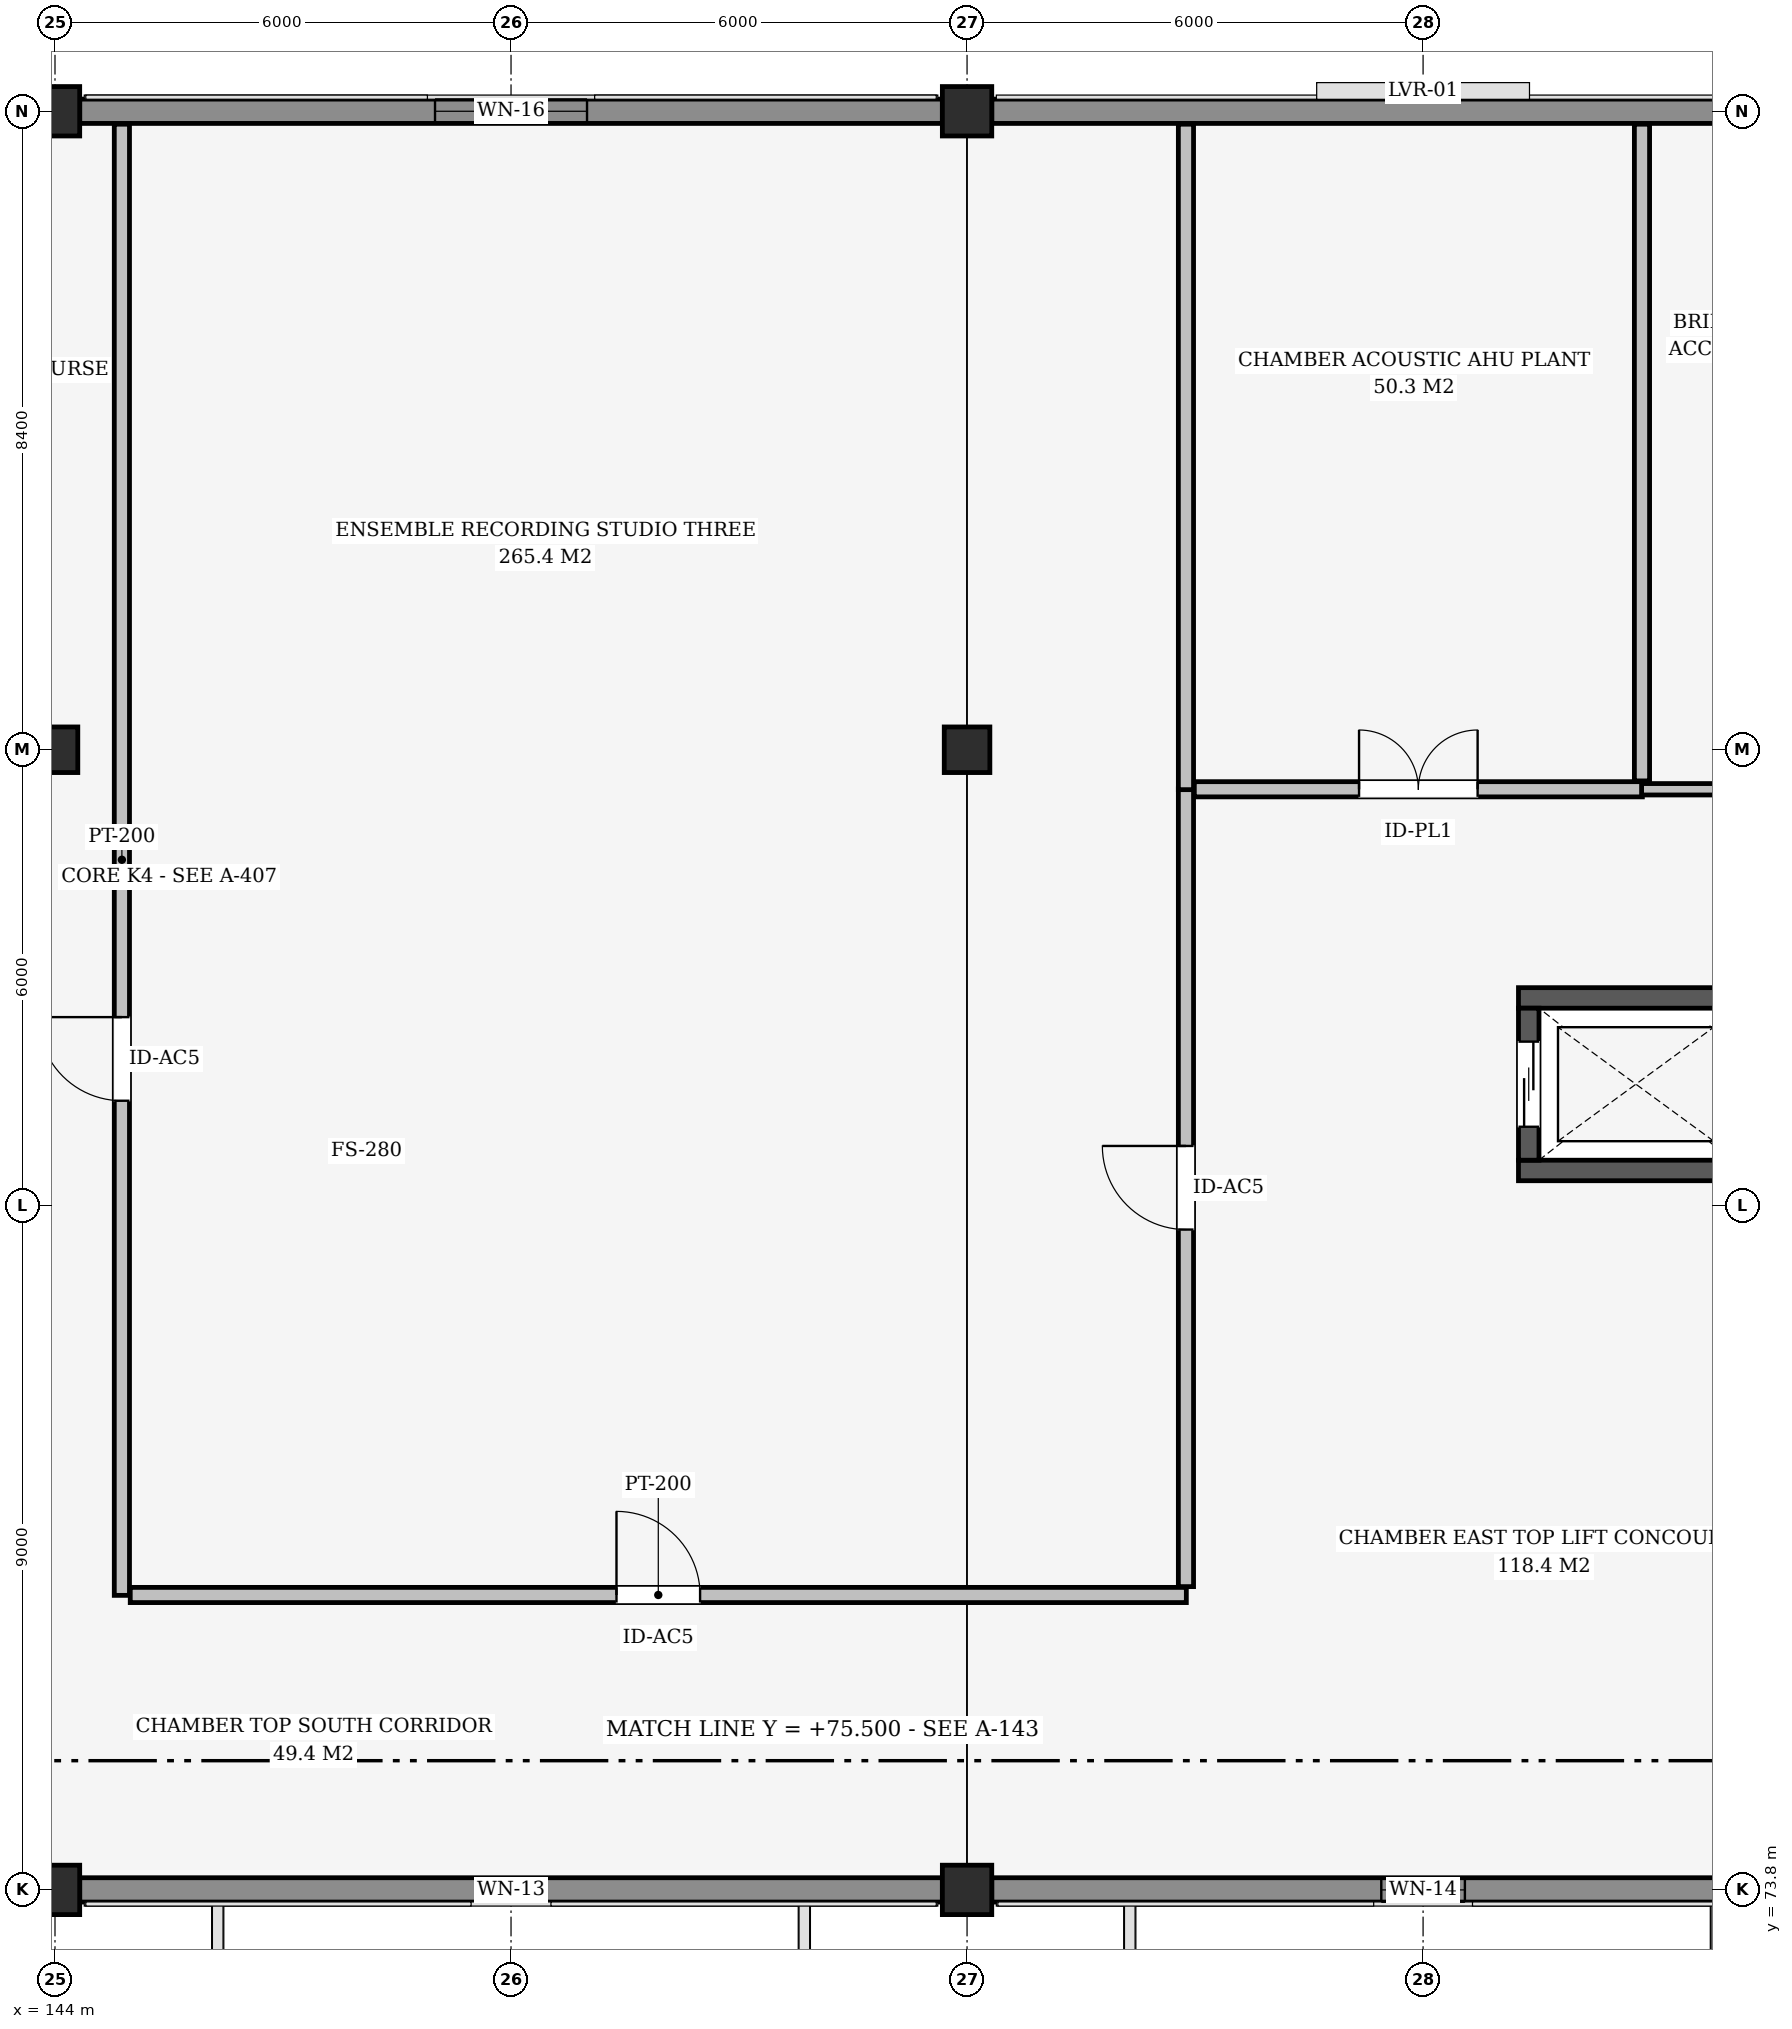
"""IFC4 building model, lengths in metres.
Left out: names, types, materials, properties, quantities, classifications, styles, units other than length and angle.
Written with IfcOpenShell. Run it as: python <this file> out.ifc"""

import sys

from ifc_helpers import new_model, si_unit, direction, frame, frame_2d, origin, origin_2d, place, context, subcontext, project, spatial, rectangle, extrude, element, fill, save


model = new_model("IFC4")
c1 = context("Model", 3, precision=1e-05, world=origin(), true_north=direction((0.0, 1.0)))
c2 = subcontext(c1, "Body", "Model", "MODEL_VIEW")
j1 = project(units=[si_unit("LENGTHUNIT", "METRE"), si_unit("PLANEANGLEUNIT", "RADIAN")], contexts=[c1])
p1 = place(None, origin())
s1 = spatial("IfcSite", under=j1, at=p1, CompositionType="ELEMENT")
p2 = place(p1, origin())
s2 = spatial("IfcBuilding", under=s1, at=p2, CompositionType="ELEMENT")
p3 = place(p2, frame((0.0, 0.0, 13.8)))
s3 = spatial("IfcBuildingStorey", under=s2, at=p3, CompositionType="ELEMENT", Elevation=13.8)
p4 = place(p3, frame((144.0, 73.8, 0.0), z_axis=(0.0, 0.0, 1.0), x_axis=(1.0, 0.0, 0.0)))
e1 = element("IfcColumn", 1, at=p4, inside=s3, PredefinedType="COLUMN", context=c2, shape_type="SweptSolid", body=[
    extrude(rectangle(XDim=0.65, YDim=0.65, at=origin_2d()), origin(), (0.0, 0.0, 1.0), 4.5),
])
p5 = place(p3, frame((144.0, 88.8, 0.0), z_axis=(0.0, 0.0, 1.0), x_axis=(1.0, 0.0, 0.0)))
e2 = element("IfcColumn", 2, at=p5, inside=s3, PredefinedType="COLUMN", context=c2, shape_type="SweptSolid", body=[
    extrude(rectangle(XDim=0.6, YDim=0.6, at=origin_2d()), origin(), (0.0, 0.0, 1.0), 4.5),
])
for number, where, z_axis, x_axis in (
    (3, (144.0, 97.2, 0.0), (0.0, 0.0, 1.0), (1.0, 0.0, 0.0)),
    (4, (156.0, 73.8, 0.0), (0.0, 0.0, 1.0), (1.0, 0.0, 0.0)),
):
    element("IfcColumn", number, at=place(p3, frame(where, z_axis=z_axis, x_axis=x_axis)), inside=s3, PredefinedType="COLUMN", context=c2, shape_type="SweptSolid", body=[
        extrude(rectangle(XDim=0.65, YDim=0.65, at=origin_2d()), origin(), (0.0, 0.0, 1.0), 4.5),
    ])
p6 = place(p3, frame((156.0, 88.8, 0.0), z_axis=(0.0, 0.0, 1.0), x_axis=(1.0, 0.0, 0.0)))
e5 = element("IfcColumn", 5, at=p6, inside=s3, PredefinedType="COLUMN", context=c2, shape_type="SweptSolid", body=[
    extrude(rectangle(XDim=0.6, YDim=0.6, at=origin_2d()), origin(), (0.0, 0.0, 1.0), 4.5),
])
p7 = place(p3, frame((156.0, 97.2, 0.0), z_axis=(0.0, 0.0, 1.0), x_axis=(1.0, 0.0, 0.0)))
e6 = element("IfcColumn", 6, at=p7, inside=s3, PredefinedType="COLUMN", context=c2, shape_type="SweptSolid", body=[
    extrude(rectangle(XDim=0.65, YDim=0.65, at=origin_2d()), origin(), (0.0, 0.0, 1.0), 4.5),
])
p8 = place(p3, frame((155.675, 73.8, 0.0), z_axis=(0.0, 0.0, 1.0), x_axis=(-1.0, 0.0, 0.0)))
e7 = element("IfcWall", 7, at=p8, inside=s3, PredefinedType="SOLIDWALL", context=c2, shape_type="SweptSolid", body=[
    extrude(rectangle(XDim=11.35, YDim=0.32, at=frame_2d((5.675, 0.0))), origin(), (0.0, 0.0, 1.0), 3.944),
])
p9 = place(p8, frame((5.25, 0.0, 0.6)))
e8 = element("IfcOpeningElement", 8, at=p9, cuts=e7, PredefinedType="OPENING", context=c2, shape_type="SweptSolid", body=[
    extrude(rectangle(XDim=0.85, YDim=2.35, at=frame_2d((0.425, 1.175))), frame((0.0, 0.17, 0.0), z_axis=(0.0, -1.0, 0.0), x_axis=(1.0, 0.0, 0.0)), (0.0, 0.0, 1.0), 0.34),
])
p10 = place(p3, frame((167.675, 73.8, 0.0), z_axis=(0.0, 0.0, 1.0), x_axis=(-1.0, 0.0, 0.0)))
e9 = element("IfcWall", 9, at=p10, inside=s3, PredefinedType="SOLIDWALL", context=c2, shape_type="SweptSolid", body=[
    extrude(rectangle(XDim=11.35, YDim=0.32, at=frame_2d((5.675, 0.0))), origin(), (0.0, 0.0, 1.0), 3.944),
])
p11 = place(p10, frame((5.125, 0.0, 0.6)))
e10 = element("IfcOpeningElement", 10, at=p11, cuts=e9, PredefinedType="OPENING", context=c2, shape_type="SweptSolid", body=[
    extrude(rectangle(XDim=1.1, YDim=2.4, at=frame_2d((0.55, 1.2))), frame((0.0, 0.17, 0.0), z_axis=(0.0, -1.0, 0.0), x_axis=(1.0, 0.0, 0.0)), (0.0, 0.0, 1.0), 0.34),
])
p12 = place(p3, frame((144.325, 97.2, 0.0), z_axis=(0.0, 0.0, 1.0), x_axis=(1.0, 0.0, 0.0)))
e11 = element("IfcWall", 11, at=p12, inside=s3, PredefinedType="SOLIDWALL", context=c2, shape_type="SweptSolid", body=[
    extrude(rectangle(XDim=11.35, YDim=0.32, at=frame_2d((5.675, 0.0))), origin(), (0.0, 0.0, 1.0), 3.944),
])
p13 = place(p12, frame((4.675, 0.0, 0.85)))
e12 = element("IfcOpeningElement", 12, at=p13, cuts=e11, PredefinedType="OPENING", context=c2, shape_type="SweptSolid", body=[
    extrude(rectangle(XDim=2.0, YDim=1.85, at=frame_2d((1.0, 0.925))), frame((0.0, 0.17, 0.0), z_axis=(0.0, -1.0, 0.0), x_axis=(1.0, 0.0, 0.0)), (0.0, 0.0, 1.0), 0.34),
])
p14 = place(p3, frame((156.325, 97.2, 0.0), z_axis=(0.0, 0.0, 1.0), x_axis=(1.0, 0.0, 0.0)))
e13 = element("IfcWall", 13, at=p14, inside=s3, PredefinedType="SOLIDWALL", context=c2, shape_type="SweptSolid", body=[
    extrude(rectangle(XDim=11.35, YDim=0.32, at=frame_2d((5.675, 0.0))), origin(), (0.0, 0.0, 1.0), 3.944),
])
for number, where, z_axis, x_axis in (
    (14, (163.255, 83.265, 0.0), (0.0, 0.0, 1.0), (1.0, 0.0, 0.0)),
    (15, (163.255, 85.535, 0.0), (0.0, 0.0, 1.0), (1.0, 0.0, 0.0)),
):
    element("IfcWall", number, at=place(p3, frame(where, z_axis=z_axis, x_axis=x_axis)), inside=s3, PredefinedType="SHEAR", context=c2, shape_type="SweptSolid", body=[
        extrude(rectangle(XDim=3.09, YDim=0.27, at=frame_2d((1.545, 0.0))), origin(), (0.0, 0.0, 1.0), 4.5),
    ])
p15 = place(p3, frame((163.39, 83.4, 0.0), z_axis=(0.0, 0.0, 1.0), x_axis=(0.0, 1.0, 0.0)))
e16 = element("IfcWall", 16, at=p15, inside=s3, PredefinedType="SHEAR", context=c2, shape_type="SweptSolid", body=[
    extrude(rectangle(XDim=2.0, YDim=0.27, at=frame_2d((1.0, 0.0))), origin(), (0.0, 0.0, 1.0), 4.5),
])
p16 = place(p15, frame((0.44, 0.0, 0.0)))
e17 = element("IfcOpeningElement", 17, at=p16, cuts=e16, PredefinedType="OPENING", context=c2, shape_type="SweptSolid", body=[
    extrude(rectangle(XDim=1.12, YDim=2.15, at=frame_2d((0.56, 1.075))), frame((0.0, 0.145, 0.0), z_axis=(0.0, -1.0, 0.0), x_axis=(1.0, 0.0, 0.0)), (0.0, 0.0, 1.0), 0.29),
])
p17 = place(p3, frame((144.88, 77.675, 0.0), z_axis=(0.0, 0.0, 1.0), x_axis=(0.0, 1.0, 0.0)))
e18 = element("IfcWall", 18, at=p17, inside=s3, PredefinedType="PARTITIONING", context=c2, shape_type="SweptSolid", body=[
    extrude(rectangle(XDim=19.355, YDim=0.2, at=frame_2d((9.677, 0.0))), origin(), (0.0, 0.0, 1.0), 4.5),
])
p18 = place(p17, frame((6.507, 0.0, 0.0)))
e19 = element("IfcOpeningElement", 19, at=p18, cuts=e18, PredefinedType="OPENING", context=c2, shape_type="SweptSolid", body=[
    extrude(rectangle(XDim=1.1, YDim=2.26, at=frame_2d((0.55, 1.13))), frame((0.0, 0.11, 0.0), z_axis=(0.0, -1.0, 0.0), x_axis=(1.0, 0.0, 0.0)), (0.0, 0.0, 1.0), 0.22),
])
p19 = place(p3, frame((144.99, 77.68, 0.0), z_axis=(0.0, 0.0, 1.0), x_axis=(1.0, 0.0, 0.0)))
e20 = element("IfcWall", 20, at=p19, inside=s3, PredefinedType="PARTITIONING", context=c2, shape_type="SweptSolid", body=[
    extrude(rectangle(XDim=13.895, YDim=0.2, at=frame_2d((6.948, 0.0))), origin(), (0.0, 0.0, 1.0), 4.5),
])
p20 = place(p19, frame((6.397, 0.0, 0.0)))
e21 = element("IfcOpeningElement", 21, at=p20, cuts=e20, PredefinedType="OPENING", context=c2, shape_type="SweptSolid", body=[
    extrude(rectangle(XDim=1.1, YDim=2.26, at=frame_2d((0.55, 1.13))), frame((0.0, 0.11, 0.0), z_axis=(0.0, -1.0, 0.0), x_axis=(1.0, 0.0, 0.0)), (0.0, 0.0, 1.0), 0.22),
])
p21 = place(p3, frame((158.88, 77.79, 0.0), z_axis=(0.0, 0.0, 1.0), x_axis=(0.0, 1.0, 0.0)))
e22 = element("IfcWall", 22, at=p21, inside=s3, PredefinedType="PARTITIONING", context=c2, shape_type="SweptSolid", body=[
    extrude(rectangle(XDim=10.495, YDim=0.2, at=frame_2d((5.248, 0.0))), origin(), (0.0, 0.0, 1.0), 4.5),
])
p22 = place(p21, frame((4.698, 0.0, 0.0)))
e23 = element("IfcOpeningElement", 23, at=p22, cuts=e22, PredefinedType="OPENING", context=c2, shape_type="SweptSolid", body=[
    extrude(rectangle(XDim=1.1, YDim=2.26, at=frame_2d((0.55, 1.13))), frame((0.0, 0.11, 0.0), z_axis=(0.0, -1.0, 0.0), x_axis=(1.0, 0.0, 0.0)), (0.0, 0.0, 1.0), 0.22),
])
p23 = place(p3, frame((158.88, 88.275, 0.0), z_axis=(0.0, 0.0, 1.0), x_axis=(0.0, 1.0, 0.0)))
e24 = element("IfcWall", 24, at=p23, inside=s3, PredefinedType="PARTITIONING", context=c2, shape_type="SweptSolid", body=[
    extrude(rectangle(XDim=8.755, YDim=0.2, at=frame_2d((4.377, 0.0))), origin(), (0.0, 0.0, 1.0), 4.5),
])
p24 = place(p3, frame((158.99, 88.28, 0.0), z_axis=(0.0, 0.0, 1.0), x_axis=(1.0, 0.0, 0.0)))
e25 = element("IfcWall", 25, at=p24, inside=s3, PredefinedType="PARTITIONING", context=c2, shape_type="SweptSolid", body=[
    extrude(rectangle(XDim=5.895, YDim=0.2, at=frame_2d((2.948, 0.0))), origin(), (0.0, 0.0, 1.0), 3.944),
])
p25 = place(p24, frame((2.167, 0.0, 0.0)))
e26 = element("IfcOpeningElement", 26, at=p25, cuts=e25, PredefinedType="OPENING", context=c2, shape_type="SweptSolid", body=[
    extrude(rectangle(XDim=1.56, YDim=2.26, at=frame_2d((0.78, 1.13))), frame((0.0, 0.11, 0.0), z_axis=(0.0, -1.0, 0.0), x_axis=(1.0, 0.0, 0.0)), (0.0, 0.0, 1.0), 0.22),
])
p26 = place(p3, frame((164.875, 88.28, 0.0), z_axis=(0.0, 0.0, 1.0), x_axis=(1.0, 0.0, 0.0)))
e27 = element("IfcWall", 27, at=p26, inside=s3, PredefinedType="PARTITIONING", context=c2, shape_type="SweptSolid", body=[
    extrude(rectangle(XDim=2.955, YDim=0.15, at=frame_2d((1.478, 0.0))), origin(), (0.0, 0.0, 1.0), 3.944),
])
p27 = place(p26, frame((1.008, 0.0, 0.0)))
e28 = element("IfcOpeningElement", 28, at=p27, cuts=e27, PredefinedType="OPENING", context=c2, shape_type="SweptSolid", body=[
    extrude(rectangle(XDim=0.94, YDim=2.1, at=frame_2d((0.47, 1.05))), frame((0.0, 0.085, 0.0), z_axis=(0.0, -1.0, 0.0), x_axis=(1.0, 0.0, 0.0)), (0.0, 0.0, 1.0), 0.17),
])
p28 = place(p3, frame((164.88, 88.39, 0.0), z_axis=(0.0, 0.0, 1.0), x_axis=(0.0, 1.0, 0.0)))
e29 = element("IfcWall", 29, at=p28, inside=s3, PredefinedType="PARTITIONING", context=c2, shape_type="SweptSolid", body=[
    extrude(rectangle(XDim=8.64, YDim=0.2, at=frame_2d((4.32, 0.0))), origin(), (0.0, 0.0, 1.0), 4.5),
])
p29 = place(p9, origin())
e30 = element("IfcWindow", 30, at=p29, inside=s3, PartitioningType="SINGLE_PANEL", PredefinedType="WINDOW", context=c2, shape_type="SweptSolid", body=[
    extrude(rectangle(XDim=0.85, YDim=2.35, at=frame_2d((0.425, 1.175))), frame((0.0, 0.03, 0.0), z_axis=(0.0, -1.0, 0.0), x_axis=(1.0, 0.0, 0.0)), (0.0, 0.0, 1.0), 0.06),
])
fill(e8, e30)
p30 = place(p11, origin())
e31 = element("IfcWindow", 31, at=p30, inside=s3, PartitioningType="SINGLE_PANEL", PredefinedType="WINDOW", context=c2, shape_type="SweptSolid", body=[
    extrude(rectangle(XDim=1.1, YDim=2.4, at=frame_2d((0.55, 1.2))), frame((0.0, 0.03, 0.0), z_axis=(0.0, -1.0, 0.0), x_axis=(1.0, 0.0, 0.0)), (0.0, 0.0, 1.0), 0.06),
])
fill(e10, e31)
p31 = place(p13, origin())
e32 = element("IfcWindow", 32, at=p31, inside=s3, PartitioningType="SINGLE_PANEL", PredefinedType="WINDOW", context=c2, shape_type="SweptSolid", body=[
    extrude(rectangle(XDim=2.0, YDim=1.85, at=frame_2d((1.0, 0.925))), frame((0.0, 0.03, 0.0), z_axis=(0.0, -1.0, 0.0), x_axis=(1.0, 0.0, 0.0)), (0.0, 0.0, 1.0), 0.06),
])
fill(e12, e32)
p32 = place(p16, origin())
e33 = element("IfcDoor", 33, at=p32, inside=s3, OperationType="SLIDING_TO_LEFT", PredefinedType="DOOR", context=c2, shape_type="SweptSolid", body=[
    extrude(rectangle(XDim=1.12, YDim=2.15, at=frame_2d((0.56, 1.075))), frame((0.0, 0.025, 0.0), z_axis=(0.0, -1.0, 0.0), x_axis=(1.0, 0.0, 0.0)), (0.0, 0.0, 1.0), 0.05),
])
fill(e17, e33)
p33 = place(p18, origin())
e34 = element("IfcDoor", 34, at=p33, inside=s3, OperationType="SINGLE_SWING_RIGHT", PredefinedType="DOOR", context=c2, shape_type="SweptSolid", body=[
    extrude(rectangle(XDim=1.1, YDim=2.26, at=frame_2d((0.55, 1.13))), frame((0.0, 0.025, 0.0), z_axis=(0.0, -1.0, 0.0), x_axis=(1.0, 0.0, 0.0)), (0.0, 0.0, 1.0), 0.05),
])
fill(e19, e34)
p34 = place(p20, origin())
e35 = element("IfcDoor", 35, at=p34, inside=s3, OperationType="SINGLE_SWING_LEFT", PredefinedType="DOOR", context=c2, shape_type="SweptSolid", body=[
    extrude(rectangle(XDim=1.1, YDim=2.26, at=frame_2d((0.55, 1.13))), frame((0.0, 0.025, 0.0), z_axis=(0.0, -1.0, 0.0), x_axis=(1.0, 0.0, 0.0)), (0.0, 0.0, 1.0), 0.05),
])
fill(e21, e35)
p35 = place(p22, origin())
e36 = element("IfcDoor", 36, at=p35, inside=s3, OperationType="SINGLE_SWING_RIGHT", PredefinedType="DOOR", context=c2, shape_type="SweptSolid", body=[
    extrude(rectangle(XDim=1.1, YDim=2.26, at=frame_2d((0.55, 1.13))), frame((0.0, 0.025, 0.0), z_axis=(0.0, -1.0, 0.0), x_axis=(1.0, 0.0, 0.0)), (0.0, 0.0, 1.0), 0.05),
])
fill(e23, e36)
p36 = place(p25, origin())
e37 = element("IfcDoor", 37, at=p36, inside=s3, OperationType="DOUBLE_DOOR_SINGLE_SWING", PredefinedType="DOOR", context=c2, shape_type="SweptSolid", body=[
    extrude(rectangle(XDim=1.56, YDim=2.26, at=frame_2d((0.78, 1.13))), frame((0.0, 0.025, 0.0), z_axis=(0.0, -1.0, 0.0), x_axis=(1.0, 0.0, 0.0)), (0.0, 0.0, 1.0), 0.05),
])
fill(e26, e37)
save(model, sys.argv[1])
